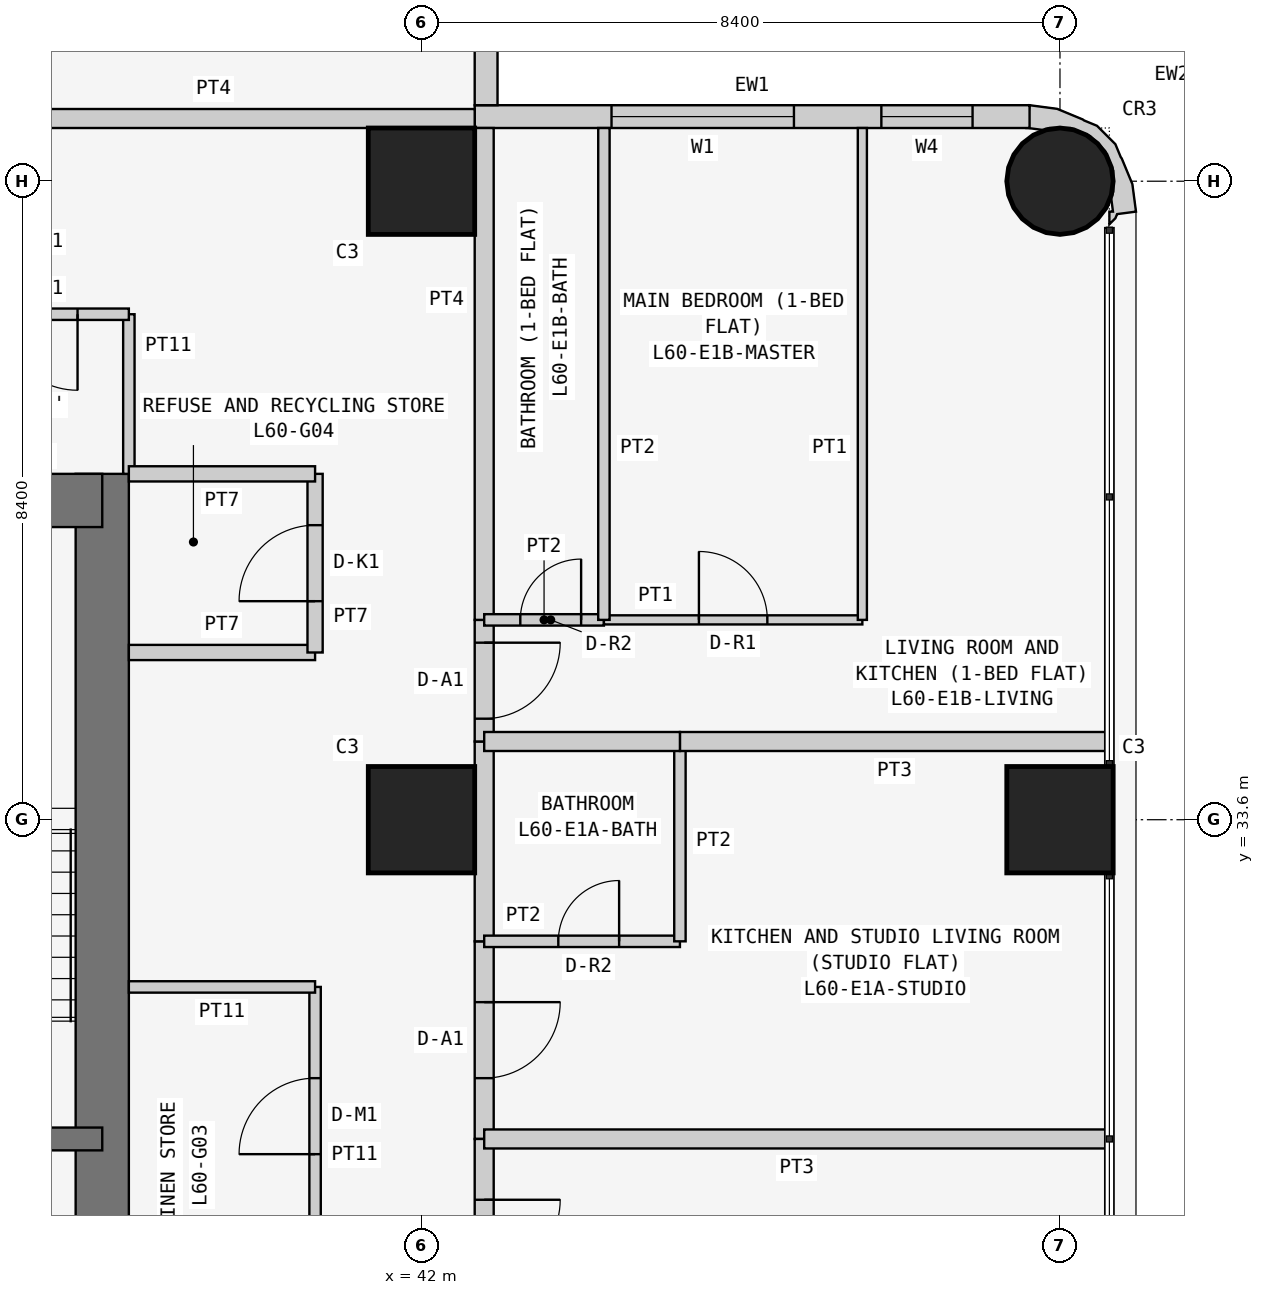
"""IFC4 building model, lengths in metres.
Left out: names, types, materials, properties, quantities, classifications, styles, units other than length and angle.
Written with IfcOpenShell. Run it as: python <this file> out.ifc"""

import sys

from ifc_helpers import new_model, si_unit, direction, frame, frame_2d, origin, origin_2d, place, context, subcontext, project, spatial, polyline, rectangle, circle, outline, extrude, element, fill, save


model = new_model("IFC4")
c1 = context("Model", 3, precision=1e-05, world=origin(), true_north=direction((0.0, 1.0)))
c2 = subcontext(c1, "Body", "Model", "MODEL_VIEW")
j1 = project(units=[si_unit("LENGTHUNIT", "METRE"), si_unit("PLANEANGLEUNIT", "RADIAN")], contexts=[c1])
p1 = place(None, origin())
s1 = spatial("IfcSite", under=j1, at=p1, CompositionType="ELEMENT")
p2 = place(p1, origin())
s2 = spatial("IfcBuilding", under=s1, at=p2, CompositionType="ELEMENT")
p3 = place(p2, frame((0.0, 0.0, 230.1)))
s3 = spatial("IfcBuildingStorey", under=s2, at=p3, CompositionType="ELEMENT", Elevation=230.1)
for number, where, z_axis, x_axis in (
    (1, (42.0, 33.6, 0.0), (0.0, 0.0, 1.0), (1.0, 0.0, 0.0)),
    (2, (42.0, 42.0, 0.0), (0.0, 0.0, 1.0), (1.0, 0.0, 0.0)),
    (3, (50.4, 33.6, 0.0), (0.0, 0.0, 1.0), (1.0, 0.0, 0.0)),
):
    element("IfcColumn", number, at=place(p3, frame(where, z_axis=z_axis, x_axis=x_axis)), inside=s3, PredefinedType="COLUMN", context=c2, shape_type="SweptSolid", body=[
        extrude(rectangle(XDim=1.4, YDim=1.4, at=origin_2d()), origin(), (0.0, 0.0, 1.0), 3.6),
    ])
p4 = place(p3, frame((50.4, 42.0, 0.0), z_axis=(0.0, 0.0, 1.0), x_axis=(1.0, 0.0, 0.0)))
e4 = element("IfcColumn", 4, at=p4, inside=s3, PredefinedType="COLUMN", context=c2, shape_type="SweptSolid", body=[
    extrude(circle(Radius=0.7, at=origin_2d()), origin(), (0.0, 0.0, 1.0), 3.6),
])
p5 = place(p3, frame((37.8, 21.0, 0.0), z_axis=(0.0, 0.0, 1.0), x_axis=(0.0, 1.0, 0.0)))
e5 = element("IfcWall", 5, at=p5, inside=s3, PredefinedType="SHEAR", context=c2, shape_type="SweptSolid", body=[
    extrude(rectangle(XDim=17.15, YDim=0.7, at=frame_2d((8.575, 0.0))), origin(), (0.0, 0.0, 1.0), 3.6),
])
p6 = place(p5, frame((5.2, 0.0, 0.0)))
e6 = element("IfcOpeningElement", 6, at=p6, cuts=e5, PredefinedType="OPENING", context=c2, shape_type="SweptSolid", body=[
    extrude(rectangle(XDim=1.2, YDim=2.1, at=frame_2d((0.6, 1.05))), frame((0.0, 0.36, 0.0), z_axis=(0.0, -1.0, 0.0), x_axis=(1.0, 0.0, 0.0)), (0.0, 0.0, 1.0), 0.72),
])
p7 = place(p3, frame((37.8, 37.8, 0.0), z_axis=(0.0, 0.0, 1.0), x_axis=(-1.0, 0.0, 0.0)))
e7 = element("IfcWall", 7, at=p7, inside=s3, PredefinedType="SHEAR", context=c2, shape_type="SweptSolid", body=[
    extrude(rectangle(XDim=17.15, YDim=0.7, at=frame_2d((8.575, 0.0))), origin(), (0.0, 0.0, 1.0), 3.6),
])
p8 = place(p3, frame((32.2, 29.4, 0.0), z_axis=(0.0, 0.0, 1.0), x_axis=(1.0, 0.0, 0.0)))
e8 = element("IfcWall", 8, at=p8, inside=s3, PredefinedType="SHEAR", context=c2, shape_type="SweptSolid", body=[
    extrude(rectangle(XDim=5.6, YDim=0.3, at=frame_2d((2.8, 0.0))), origin(), (0.0, 0.0, 1.0), 3.6),
])
p9 = place(p8, frame((2.0, 0.0, 0.0)))
e9 = element("IfcOpeningElement", 9, at=p9, cuts=e8, PredefinedType="OPENING", context=c2, shape_type="SweptSolid", body=[
    extrude(rectangle(XDim=1.2, YDim=2.1, at=frame_2d((0.6, 1.05))), frame((0.0, 0.16, 0.0), z_axis=(0.0, -1.0, 0.0), x_axis=(1.0, 0.0, 0.0)), (0.0, 0.0, 1.0), 0.32),
])
p10 = place(p3, frame((50.0, 42.85, 0.0), z_axis=(0.0, 0.0, 1.0), x_axis=(-1.0, 0.0, 0.0)))
e10 = element("IfcWall", 10, at=p10, inside=s3, PredefinedType="SOLIDWALL", context=c2, shape_type="SweptSolid", body=[
    extrude(rectangle(XDim=7.3, YDim=0.3, at=frame_2d((3.65, 0.0))), origin(), (0.0, 0.0, 1.0), 3.45),
])
p11 = place(p10, frame((3.1, 0.0, 0.9)))
e11 = element("IfcOpeningElement", 11, at=p11, cuts=e10, PredefinedType="OPENING", context=c2, shape_type="SweptSolid", body=[
    extrude(rectangle(XDim=2.4, YDim=1.5, at=frame_2d((1.2, 0.75))), frame((0.0, 0.16, 0.0), z_axis=(0.0, -1.0, 0.0), x_axis=(1.0, 0.0, 0.0)), (0.0, 0.0, 1.0), 0.32),
])
p12 = place(p10, frame((0.75, 0.0, 0.9)))
e12 = element("IfcOpeningElement", 12, at=p12, cuts=e10, PredefinedType="OPENING", context=c2, shape_type="SweptSolid", body=[
    extrude(rectangle(XDim=1.2, YDim=1.5, at=frame_2d((0.6, 0.75))), frame((0.0, 0.16, 0.0), z_axis=(0.0, -1.0, 0.0), x_axis=(1.0, 0.0, 0.0)), (0.0, 0.0, 1.0), 0.32),
])
p13 = place(p3, frame((42.85, 43.0, 0.0), z_axis=(0.0, 0.0, 1.0), x_axis=(0.0, 1.0, 0.0)))
e13 = element("IfcWall", 13, at=p13, inside=s3, PredefinedType="SOLIDWALL", context=c2, shape_type="SweptSolid", body=[
    extrude(rectangle(XDim=7.0, YDim=0.3, at=frame_2d((3.5, 0.0))), origin(), (0.0, 0.0, 1.0), 3.45),
])
p14 = place(p13, frame((1.5, 0.0, 0.9)))
e14 = element("IfcOpeningElement", 14, at=p14, cuts=e13, PredefinedType="OPENING", context=c2, shape_type="SweptSolid", body=[
    extrude(rectangle(XDim=2.4, YDim=1.5, at=frame_2d((1.2, 0.75))), frame((0.0, 0.16, 0.0), z_axis=(0.0, -1.0, 0.0), x_axis=(1.0, 0.0, 0.0)), (0.0, 0.0, 1.0), 0.32),
])
p15 = place(p13, frame((5.05, 0.0, 0.9)))
e15 = element("IfcOpeningElement", 15, at=p15, cuts=e13, PredefinedType="OPENING", context=c2, shape_type="SweptSolid", body=[
    extrude(rectangle(XDim=1.2, YDim=1.5, at=frame_2d((0.6, 0.75))), frame((0.0, 0.16, 0.0), z_axis=(0.0, -1.0, 0.0), x_axis=(1.0, 0.0, 0.0)), (0.0, 0.0, 1.0), 0.32),
])
p16 = place(p3, frame((50.988, 41.488, 0.0), z_axis=(0.0, 0.0, 1.0), x_axis=(0.898030234854, 0.439933741929, 0.0)))
e16 = element("IfcWall", 16, at=p16, inside=s3, PredefinedType="SOLIDWALL", context=c2, shape_type="SweptSolid", body=[
    extrude(outline(polyline([(0.138, -0.04), (0.182, -0.0), (0.419, -0.08), (0.536, 0.266), (0.559, 0.631), (0.555, 0.651), (0.566, 0.836), (0.455, 1.159), (0.333, 1.298), (0.324, 1.317), (0.082, 1.591), (-0.222, 1.793), (-0.39, 1.541), (-0.372, 1.532), (-0.195, 1.414), (-0.12, 1.41), (0.131, 1.287), (0.315, 1.078), (0.406, 0.814), (0.388, 0.536), (0.265, 0.285), (0.209, 0.235), (0.148, 0.053), (0.105, 0.074), (0.032, -0.076), (0.138, -0.04)])), origin(), (0.0, 0.0, 1.0), 3.45),
])
p17 = place(p3, frame((38.15, 38.15, 0.0), z_axis=(0.0, 0.0, 1.0), x_axis=(0.0, 1.0, 0.0)))
e17 = element("IfcWall", 17, at=p17, inside=s3, PredefinedType="PARTITIONING", context=c2, shape_type="SweptSolid", body=[
    extrude(rectangle(XDim=2.1, YDim=0.15, at=frame_2d((1.05, 0.0))), origin(), (0.0, 0.0, 1.0), 3.45),
])
p18 = place(p3, frame((38.15, 40.25, 0.0), z_axis=(0.0, 0.0, 1.0), x_axis=(-1.0, 0.0, 0.0)))
e18 = element("IfcWall", 18, at=p18, inside=s3, PredefinedType="PARTITIONING", context=c2, shape_type="SweptSolid", body=[
    extrude(rectangle(XDim=2.35, YDim=0.15, at=frame_2d((1.175, 0.0))), origin(), (0.0, 0.0, 1.0), 3.45),
])
p19 = place(p18, frame((0.675, 0.0, 0.0)))
e19 = element("IfcOpeningElement", 19, at=p19, cuts=e18, PredefinedType="OPENING", context=c2, shape_type="SweptSolid", body=[
    extrude(rectangle(XDim=1.0, YDim=2.1, at=frame_2d((0.5, 1.05))), frame((0.0, 0.085, 0.0), z_axis=(0.0, -1.0, 0.0), x_axis=(1.0, 0.0, 0.0)), (0.0, 0.0, 1.0), 0.17),
])
p20 = place(p3, frame((40.6, 28.0, 0.0), z_axis=(0.0, 0.0, 1.0), x_axis=(0.0, 1.0, 0.0)))
e20 = element("IfcWall", 20, at=p20, inside=s3, PredefinedType="PARTITIONING", context=c2, shape_type="SweptSolid", body=[
    extrude(rectangle(XDim=3.4, YDim=0.15, at=frame_2d((1.7, 0.0))), origin(), (0.0, 0.0, 1.0), 3.45),
])
p21 = place(p20, frame((1.2, 0.0, 0.0)))
e21 = element("IfcOpeningElement", 21, at=p21, cuts=e20, PredefinedType="OPENING", context=c2, shape_type="SweptSolid", body=[
    extrude(rectangle(XDim=1.0, YDim=2.1, at=frame_2d((0.5, 1.05))), frame((0.0, 0.085, 0.0), z_axis=(0.0, -1.0, 0.0), x_axis=(1.0, 0.0, 0.0)), (0.0, 0.0, 1.0), 0.17),
])
p22 = place(p3, frame((40.6, 31.4, 0.0), z_axis=(0.0, 0.0, 1.0), x_axis=(-1.0, 0.0, 0.0)))
e22 = element("IfcWall", 22, at=p22, inside=s3, PredefinedType="PARTITIONING", context=c2, shape_type="SweptSolid", body=[
    extrude(rectangle(XDim=2.45, YDim=0.15, at=frame_2d((1.225, 0.0))), origin(), (0.0, 0.0, 1.0), 3.45),
])
p23 = place(p3, frame((38.15, 35.8, 0.0), z_axis=(0.0, 0.0, 1.0), x_axis=(1.0, 0.0, 0.0)))
e23 = element("IfcWall", 23, at=p23, inside=s3, PredefinedType="PARTITIONING", context=c2, shape_type="SweptSolid", body=[
    extrude(rectangle(XDim=2.45, YDim=0.2, at=frame_2d((1.225, 0.0))), origin(), (0.0, 0.0, 1.0), 3.45),
])
p24 = place(p3, frame((40.6, 35.8, 0.0), z_axis=(0.0, 0.0, 1.0), x_axis=(0.0, 1.0, 0.0)))
e24 = element("IfcWall", 24, at=p24, inside=s3, PredefinedType="PARTITIONING", context=c2, shape_type="SweptSolid", body=[
    extrude(rectangle(XDim=2.35, YDim=0.2, at=frame_2d((1.175, 0.0))), origin(), (0.0, 0.0, 1.0), 3.45),
])
p25 = place(p24, frame((0.675, 0.0, 0.0)))
e25 = element("IfcOpeningElement", 25, at=p25, cuts=e24, PredefinedType="OPENING", context=c2, shape_type="SweptSolid", body=[
    extrude(rectangle(XDim=1.0, YDim=2.1, at=frame_2d((0.5, 1.05))), frame((0.0, 0.11, 0.0), z_axis=(0.0, -1.0, 0.0), x_axis=(1.0, 0.0, 0.0)), (0.0, 0.0, 1.0), 0.22),
])
p26 = place(p3, frame((40.6, 38.15, 0.0), z_axis=(0.0, 0.0, 1.0), x_axis=(-1.0, 0.0, 0.0)))
e26 = element("IfcWall", 26, at=p26, inside=s3, PredefinedType="PARTITIONING", context=c2, shape_type="SweptSolid", body=[
    extrude(rectangle(XDim=2.45, YDim=0.2, at=frame_2d((1.225, 0.0))), origin(), (0.0, 0.0, 1.0), 3.45),
])
p27 = place(p3, frame((35.829, 42.825, 0.0), z_axis=(0.0, 0.0, 1.0), x_axis=(1.0, 0.0, 0.0)))
e27 = element("IfcWall", 27, at=p27, inside=s3, PredefinedType="PARTITIONING", context=c2, shape_type="SweptSolid", body=[
    extrude(rectangle(XDim=6.871, YDim=0.25, at=frame_2d((3.436, 0.0))), origin(), (0.0, 0.0, 1.0), 3.45),
])
p28 = place(p3, frame((42.825, 32.0, 0.0), z_axis=(0.0, 0.0, 1.0), x_axis=(0.0, -1.0, 0.0)))
e28 = element("IfcWall", 28, at=p28, inside=s3, PredefinedType="PARTITIONING", context=c2, shape_type="SweptSolid", body=[
    extrude(rectangle(XDim=2.6, YDim=0.25, at=frame_2d((1.3, 0.0))), origin(), (0.0, 0.0, 1.0), 3.45),
])
p29 = place(p28, frame((0.8, 0.0, 0.0)))
e29 = element("IfcOpeningElement", 29, at=p29, cuts=e28, PredefinedType="OPENING", context=c2, shape_type="SweptSolid", body=[
    extrude(rectangle(XDim=1.0, YDim=2.1, at=frame_2d((0.5, 1.05))), frame((0.0, 0.135, 0.0), z_axis=(0.0, -1.0, 0.0), x_axis=(1.0, 0.0, 0.0)), (0.0, 0.0, 1.0), 0.27),
])
p30 = place(p3, frame((42.825, 34.629, 0.0), z_axis=(0.0, 0.0, 1.0), x_axis=(0.0, -1.0, 0.0)))
e30 = element("IfcWall", 30, at=p30, inside=s3, PredefinedType="PARTITIONING", context=c2, shape_type="SweptSolid", body=[
    extrude(rectangle(XDim=2.629, YDim=0.25, at=frame_2d((1.314, 0.0))), origin(), (0.0, 0.0, 1.0), 3.45),
])
p31 = place(p3, frame((42.825, 36.229, 0.0), z_axis=(0.0, 0.0, 1.0), x_axis=(0.0, -1.0, 0.0)))
e31 = element("IfcWall", 31, at=p31, inside=s3, PredefinedType="PARTITIONING", context=c2, shape_type="SweptSolid", body=[
    extrude(rectangle(XDim=1.6, YDim=0.25, at=frame_2d((0.8, 0.0))), origin(), (0.0, 0.0, 1.0), 3.45),
])
p32 = place(p31, frame((0.3, 0.0, 0.0)))
e32 = element("IfcOpeningElement", 32, at=p32, cuts=e31, PredefinedType="OPENING", context=c2, shape_type="SweptSolid", body=[
    extrude(rectangle(XDim=1.0, YDim=2.1, at=frame_2d((0.5, 1.05))), frame((0.0, 0.135, 0.0), z_axis=(0.0, -1.0, 0.0), x_axis=(1.0, 0.0, 0.0)), (0.0, 0.0, 1.0), 0.27),
])
p33 = place(p3, frame((42.825, 42.7, 0.0), z_axis=(0.0, 0.0, 1.0), x_axis=(0.0, -1.0, 0.0)))
e33 = element("IfcWall", 33, at=p33, inside=s3, PredefinedType="PARTITIONING", context=c2, shape_type="SweptSolid", body=[
    extrude(rectangle(XDim=6.471, YDim=0.25, at=frame_2d((3.235, 0.0))), origin(), (0.0, 0.0, 1.0), 3.45),
])
p34 = place(p3, frame((42.825, 29.4, 0.0), z_axis=(0.0, 0.0, 1.0), x_axis=(0.0, -1.0, 0.0)))
e34 = element("IfcWall", 34, at=p34, inside=s3, PredefinedType="PARTITIONING", context=c2, shape_type="SweptSolid", body=[
    extrude(rectangle(XDim=2.6, YDim=0.25, at=frame_2d((1.3, 0.0))), origin(), (0.0, 0.0, 1.0), 3.45),
])
p35 = place(p34, frame((0.8, 0.0, 0.0)))
e35 = element("IfcOpeningElement", 35, at=p35, cuts=e34, PredefinedType="OPENING", context=c2, shape_type="SweptSolid", body=[
    extrude(rectangle(XDim=1.0, YDim=2.1, at=frame_2d((0.5, 1.05))), frame((0.0, 0.135, 0.0), z_axis=(0.0, -1.0, 0.0), x_axis=(1.0, 0.0, 0.0)), (0.0, 0.0, 1.0), 0.27),
])
p36 = place(p3, frame((42.825, 32.0, 0.0), z_axis=(0.0, 0.0, 1.0), x_axis=(1.0, 0.0, 0.0)))
e36 = element("IfcWall", 36, at=p36, inside=s3, PredefinedType="PARTITIONING", context=c2, shape_type="SweptSolid", body=[
    extrude(rectangle(XDim=2.575, YDim=0.15, at=frame_2d((1.288, 0.0))), origin(), (0.0, 0.0, 1.0), 3.45),
])
p37 = place(p36, frame((0.975, 0.0, 0.0)))
e37 = element("IfcOpeningElement", 37, at=p37, cuts=e36, PredefinedType="OPENING", context=c2, shape_type="SweptSolid", body=[
    extrude(rectangle(XDim=0.8, YDim=2.1, at=frame_2d((0.4, 1.05))), frame((0.0, 0.085, 0.0), z_axis=(0.0, -1.0, 0.0), x_axis=(1.0, 0.0, 0.0)), (0.0, 0.0, 1.0), 0.17),
])
p38 = place(p3, frame((45.4, 32.0, 0.0), z_axis=(0.0, 0.0, 1.0), x_axis=(0.0, 1.0, 0.0)))
e38 = element("IfcWall", 38, at=p38, inside=s3, PredefinedType="PARTITIONING", context=c2, shape_type="SweptSolid", body=[
    extrude(rectangle(XDim=2.629, YDim=0.15, at=frame_2d((1.314, 0.0))), origin(), (0.0, 0.0, 1.0), 3.45),
])
p39 = place(p3, frame((45.4, 34.629, 0.0), z_axis=(0.0, 0.0, 1.0), x_axis=(1.0, 0.0, 0.0)))
e39 = element("IfcWall", 39, at=p39, inside=s3, PredefinedType="PARTITIONING", context=c2, shape_type="SweptSolid", body=[
    extrude(rectangle(XDim=5.65, YDim=0.25, at=frame_2d((2.825, 0.0))), origin(), (0.0, 0.0, 1.0), 3.45),
])
p40 = place(p3, frame((51.05, 29.4, 0.0), z_axis=(0.0, 0.0, 1.0), x_axis=(-1.0, 0.0, 0.0)))
e40 = element("IfcWall", 40, at=p40, inside=s3, PredefinedType="PARTITIONING", context=c2, shape_type="SweptSolid", body=[
    extrude(rectangle(XDim=8.225, YDim=0.25, at=frame_2d((4.113, 0.0))), origin(), (0.0, 0.0, 1.0), 3.45),
])
p41 = place(p3, frame((45.4, 34.629, 0.0), z_axis=(0.0, 0.0, 1.0), x_axis=(-1.0, 0.0, 0.0)))
e41 = element("IfcWall", 41, at=p41, inside=s3, PredefinedType="PARTITIONING", context=c2, shape_type="SweptSolid", body=[
    extrude(rectangle(XDim=2.575, YDim=0.25, at=frame_2d((1.288, 0.0))), origin(), (0.0, 0.0, 1.0), 3.45),
])
p42 = place(p3, frame((42.825, 36.229, 0.0), z_axis=(0.0, 0.0, 1.0), x_axis=(1.0, 0.0, 0.0)))
e42 = element("IfcWall", 42, at=p42, inside=s3, PredefinedType="PARTITIONING", context=c2, shape_type="SweptSolid", body=[
    extrude(rectangle(XDim=1.575, YDim=0.15, at=frame_2d((0.788, 0.0))), origin(), (0.0, 0.0, 1.0), 3.45),
])
p43 = place(p42, frame((0.475, 0.0, 0.0)))
e43 = element("IfcOpeningElement", 43, at=p43, cuts=e42, PredefinedType="OPENING", context=c2, shape_type="SweptSolid", body=[
    extrude(rectangle(XDim=0.8, YDim=2.1, at=frame_2d((0.4, 1.05))), frame((0.0, 0.085, 0.0), z_axis=(0.0, -1.0, 0.0), x_axis=(1.0, 0.0, 0.0)), (0.0, 0.0, 1.0), 0.17),
])
p44 = place(p3, frame((44.4, 36.229, 0.0), z_axis=(0.0, 0.0, 1.0), x_axis=(1.0, 0.0, 0.0)))
e44 = element("IfcWall", 44, at=p44, inside=s3, PredefinedType="PARTITIONING", context=c2, shape_type="SweptSolid", body=[
    extrude(rectangle(XDim=3.4, YDim=0.12, at=frame_2d((1.7, 0.0))), origin(), (0.0, 0.0, 1.0), 3.45),
])
p45 = place(p44, frame((1.25, 0.0, 0.0)))
e45 = element("IfcOpeningElement", 45, at=p45, cuts=e44, PredefinedType="OPENING", context=c2, shape_type="SweptSolid", body=[
    extrude(rectangle(XDim=0.9, YDim=2.1, at=frame_2d((0.45, 1.05))), frame((0.0, 0.07, 0.0), z_axis=(0.0, -1.0, 0.0), x_axis=(1.0, 0.0, 0.0)), (0.0, 0.0, 1.0), 0.14),
])
p46 = place(p3, frame((47.8, 36.229, 0.0), z_axis=(0.0, 0.0, 1.0), x_axis=(0.0, 1.0, 0.0)))
e46 = element("IfcWall", 46, at=p46, inside=s3, PredefinedType="PARTITIONING", context=c2, shape_type="SweptSolid", body=[
    extrude(rectangle(XDim=6.471, YDim=0.12, at=frame_2d((3.235, 0.0))), origin(), (0.0, 0.0, 1.0), 3.45),
])
p47 = place(p3, frame((44.4, 36.229, 0.0), z_axis=(0.0, 0.0, 1.0), x_axis=(0.0, 1.0, 0.0)))
e47 = element("IfcWall", 47, at=p47, inside=s3, PredefinedType="PARTITIONING", context=c2, shape_type="SweptSolid", body=[
    extrude(rectangle(XDim=6.471, YDim=0.15, at=frame_2d((3.235, 0.0))), origin(), (0.0, 0.0, 1.0), 3.45),
])
p48 = place(p11, origin())
e48 = element("IfcWindow", 48, at=p48, inside=s3, PartitioningType="SINGLE_PANEL", PredefinedType="WINDOW", context=c2, shape_type="SweptSolid", body=[
    extrude(rectangle(XDim=2.4, YDim=1.5, at=frame_2d((1.2, 0.75))), frame((0.0, 0.03, 0.0), z_axis=(0.0, -1.0, 0.0), x_axis=(1.0, 0.0, 0.0)), (0.0, 0.0, 1.0), 0.06),
])
fill(e11, e48)
p49 = place(p12, origin())
e49 = element("IfcWindow", 49, at=p49, inside=s3, PartitioningType="SINGLE_PANEL", PredefinedType="WINDOW", context=c2, shape_type="SweptSolid", body=[
    extrude(rectangle(XDim=1.2, YDim=1.5, at=frame_2d((0.6, 0.75))), frame((0.0, 0.03, 0.0), z_axis=(0.0, -1.0, 0.0), x_axis=(1.0, 0.0, 0.0)), (0.0, 0.0, 1.0), 0.06),
])
fill(e12, e49)
p50 = place(p19, origin())
e50 = element("IfcDoor", 50, at=p50, inside=s3, OperationType="SINGLE_SWING_LEFT", PredefinedType="DOOR", context=c2, shape_type="SweptSolid", body=[
    extrude(rectangle(XDim=1.0, YDim=2.1, at=frame_2d((0.5, 1.05))), frame((0.0, 0.025, 0.0), z_axis=(0.0, -1.0, 0.0), x_axis=(1.0, 0.0, 0.0)), (0.0, 0.0, 1.0), 0.05),
])
fill(e19, e50)
p51 = place(p21, origin())
e51 = element("IfcDoor", 51, at=p51, inside=s3, OperationType="SINGLE_SWING_LEFT", PredefinedType="DOOR", context=c2, shape_type="SweptSolid", body=[
    extrude(rectangle(XDim=1.0, YDim=2.1, at=frame_2d((0.5, 1.05))), frame((0.0, 0.025, 0.0), z_axis=(0.0, -1.0, 0.0), x_axis=(1.0, 0.0, 0.0)), (0.0, 0.0, 1.0), 0.05),
])
fill(e21, e51)
p52 = place(p25, origin())
e52 = element("IfcDoor", 52, at=p52, inside=s3, OperationType="SINGLE_SWING_LEFT", PredefinedType="DOOR", context=c2, shape_type="SweptSolid", body=[
    extrude(rectangle(XDim=1.0, YDim=2.1, at=frame_2d((0.5, 1.05))), frame((0.0, 0.025, 0.0), z_axis=(0.0, -1.0, 0.0), x_axis=(1.0, 0.0, 0.0)), (0.0, 0.0, 1.0), 0.05),
])
fill(e25, e52)
p53 = place(p29, origin())
e53 = element("IfcDoor", 53, at=p53, inside=s3, OperationType="SINGLE_SWING_LEFT", PredefinedType="DOOR", context=c2, shape_type="SweptSolid", body=[
    extrude(rectangle(XDim=1.0, YDim=2.1, at=frame_2d((0.5, 1.05))), frame((0.0, 0.025, 0.0), z_axis=(0.0, -1.0, 0.0), x_axis=(1.0, 0.0, 0.0)), (0.0, 0.0, 1.0), 0.05),
])
fill(e29, e53)
p54 = place(p37, origin())
e54 = element("IfcDoor", 54, at=p54, inside=s3, OperationType="SINGLE_SWING_RIGHT", PredefinedType="DOOR", context=c2, shape_type="SweptSolid", body=[
    extrude(rectangle(XDim=0.8, YDim=2.1, at=frame_2d((0.4, 1.05))), frame((0.0, 0.025, 0.0), z_axis=(0.0, -1.0, 0.0), x_axis=(1.0, 0.0, 0.0)), (0.0, 0.0, 1.0), 0.05),
])
fill(e37, e54)
p55 = place(p32, origin())
e55 = element("IfcDoor", 55, at=p55, inside=s3, OperationType="SINGLE_SWING_LEFT", PredefinedType="DOOR", context=c2, shape_type="SweptSolid", body=[
    extrude(rectangle(XDim=1.0, YDim=2.1, at=frame_2d((0.5, 1.05))), frame((0.0, 0.025, 0.0), z_axis=(0.0, -1.0, 0.0), x_axis=(1.0, 0.0, 0.0)), (0.0, 0.0, 1.0), 0.05),
])
fill(e32, e55)
p56 = place(p43, origin())
e56 = element("IfcDoor", 56, at=p56, inside=s3, OperationType="SINGLE_SWING_RIGHT", PredefinedType="DOOR", context=c2, shape_type="SweptSolid", body=[
    extrude(rectangle(XDim=0.8, YDim=2.1, at=frame_2d((0.4, 1.05))), frame((0.0, 0.025, 0.0), z_axis=(0.0, -1.0, 0.0), x_axis=(1.0, 0.0, 0.0)), (0.0, 0.0, 1.0), 0.05),
])
fill(e43, e56)
p57 = place(p45, origin())
e57 = element("IfcDoor", 57, at=p57, inside=s3, OperationType="SINGLE_SWING_LEFT", PredefinedType="DOOR", context=c2, shape_type="SweptSolid", body=[
    extrude(rectangle(XDim=0.9, YDim=2.1, at=frame_2d((0.45, 1.05))), frame((0.0, 0.025, 0.0), z_axis=(0.0, -1.0, 0.0), x_axis=(1.0, 0.0, 0.0)), (0.0, 0.0, 1.0), 0.05),
])
fill(e45, e57)
p58 = place(p35, origin())
e58 = element("IfcDoor", 58, at=p58, inside=s3, OperationType="SINGLE_SWING_LEFT", PredefinedType="DOOR", context=c2, shape_type="SweptSolid", body=[
    extrude(rectangle(XDim=1.0, YDim=2.1, at=frame_2d((0.5, 1.05))), frame((0.0, 0.025, 0.0), z_axis=(0.0, -1.0, 0.0), x_axis=(1.0, 0.0, 0.0)), (0.0, 0.0, 1.0), 0.05),
])
fill(e35, e58)
save(model, sys.argv[1])
